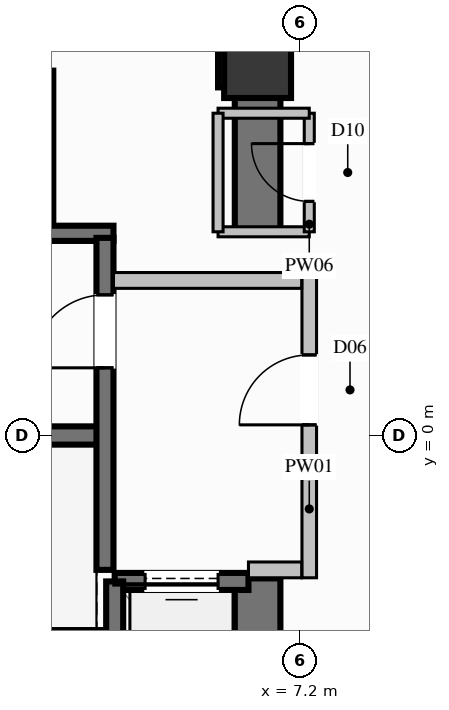
"""IFC4 building model, lengths in metres.
Left out: names, types, materials, properties, quantities, classifications, styles, units other than length and angle.
Written with IfcOpenShell. Run it as: python <this file> out.ifc"""

import sys

from ifc_helpers import new_model, si_unit, direction, frame, frame_2d, origin, origin_2d, place, context, subcontext, project, spatial, rectangle, extrude, element, fill, save


model = new_model("IFC4")
c1 = context("Model", 3, precision=1e-05, world=origin(), true_north=direction((0.0, 1.0)))
c2 = subcontext(c1, "Body", "Model", "MODEL_VIEW")
j1 = project(units=[si_unit("LENGTHUNIT", "METRE"), si_unit("PLANEANGLEUNIT", "RADIAN")], contexts=[c1])
p1 = place(None, origin())
s1 = spatial("IfcSite", under=j1, at=p1, CompositionType="ELEMENT")
p2 = place(p1, origin())
s2 = spatial("IfcBuilding", under=s1, at=p2, CompositionType="ELEMENT")
p3 = place(p2, frame((0.0, 0.0, 64.4)))
s3 = spatial("IfcBuildingStorey", under=s2, at=p3, CompositionType="ELEMENT", Elevation=64.4)
p4 = place(p3, frame((6.5, 6.1, 0.0), z_axis=(0.0, 0.0, 1.0), x_axis=(1.0, 0.0, 0.0)))
e1 = element("IfcColumn", 1, at=p4, inside=s3, PredefinedType="COLUMN", context=c2, shape_type="SweptSolid", body=[
    extrude(rectangle(XDim=1.1, YDim=1.1, at=origin_2d()), origin(), (0.0, 0.0, 1.0), 3.6),
])
p5 = place(p3, frame((-3.99, 0.0, 0.0), z_axis=(0.0, 0.0, 1.0), x_axis=(1.0, 0.0, 0.0)))
e2 = element("IfcWall", 2, at=p5, inside=s3, PredefinedType="SHEAR", context=c2, shape_type="SweptSolid", body=[
    extrude(rectangle(XDim=7.98, YDim=0.3, at=frame_2d((3.99, 0.0))), origin(), (0.0, 0.0, 1.0), 3.6),
])
for number, where, z_axis, x_axis in (
    (3, (-4.13, -3.325, 0.0), (0.0, 0.0, 1.0), (1.0, 0.0, 0.0)),
    (4, (-4.13, 3.325, 0.0), (0.0, 0.0, 1.0), (1.0, 0.0, 0.0)),
):
    element("IfcWall", number, at=place(p3, frame(where, z_axis=z_axis, x_axis=x_axis)), inside=s3, PredefinedType="SOLIDWALL", context=c2, shape_type="SweptSolid", body=[
        extrude(rectangle(XDim=8.26, YDim=0.25, at=frame_2d((4.13, 0.0))), origin(), (0.0, 0.0, 1.0), 3.6),
    ])
p6 = place(p3, frame((5.85, 6.1, 0.0), z_axis=(0.0, 0.0, 1.0), x_axis=(1.0, 0.0, 0.0)))
e5 = element("IfcWall", 5, at=p6, inside=s3, PredefinedType="SHEAR", context=c2, shape_type="SweptSolid", body=[
    extrude(rectangle(XDim=0.275, YDim=0.75, at=frame_2d((0.137, 0.0))), origin(), (0.0, 0.0, 1.0), 3.6),
])
p7 = place(p3, frame((6.5, -6.475, 0.0), z_axis=(0.0, 0.0, 1.0), x_axis=(0.0, 1.0, 0.0)))
e6 = element("IfcWall", 6, at=p7, inside=s3, PredefinedType="SHEAR", context=c2, shape_type="SweptSolid", body=[
    extrude(rectangle(XDim=4.125, YDim=0.75, at=frame_2d((2.062, 0.0))), origin(), (0.0, 0.0, 1.0), 3.6),
])
p8 = place(p3, frame((6.5, 3.35, 0.0), z_axis=(0.0, 0.0, 1.0), x_axis=(0.0, 1.0, 0.0)))
e7 = element("IfcWall", 7, at=p8, inside=s3, PredefinedType="SHEAR", context=c2, shape_type="SweptSolid", body=[
    extrude(rectangle(XDim=3.125, YDim=0.75, at=frame_2d((1.562, 0.0))), origin(), (0.0, 0.0, 1.0), 3.6),
])
p9 = place(p3, frame((3.0, 3.5, 0.0), z_axis=(0.0, 0.0, 1.0), x_axis=(0.0, 1.0, 0.0)))
e8 = element("IfcWall", 8, at=p9, inside=s3, PredefinedType="SOLIDWALL", context=c2, shape_type="SweptSolid", body=[
    extrude(rectangle(XDim=2.5, YDim=0.28, at=frame_2d((1.25, 0.0))), origin(), (0.0, 0.0, 1.0), 3.34),
])
p10 = place(p3, frame((6.35, -2.4, 0.0), z_axis=(0.0, 0.0, 1.0), x_axis=(-1.0, 0.0, 0.0)))
e9 = element("IfcWall", 9, at=p10, inside=s3, PredefinedType="SOLIDWALL", context=c2, shape_type="SweptSolid", body=[
    extrude(rectangle(XDim=2.2, YDim=0.28, at=frame_2d((1.1, 0.0))), origin(), (0.0, 0.0, 1.0), 3.34),
])
p11 = place(p10, frame((0.5, 0.0, 0.0)))
e10 = element("IfcOpeningElement", 10, at=p11, cuts=e9, PredefinedType="OPENING", context=c2, shape_type="SweptSolid", body=[
    extrude(rectangle(XDim=1.2, YDim=2.2, at=frame_2d((0.6, 1.1))), frame((0.0, 0.15, 0.0), z_axis=(0.0, -1.0, 0.0), x_axis=(1.0, 0.0, 0.0)), (0.0, 0.0, 1.0), 0.3),
])
p12 = place(p3, frame((4.15, -2.4, 0.0), z_axis=(0.0, 0.0, 1.0), x_axis=(0.0, -1.0, 0.0)))
e11 = element("IfcWall", 11, at=p12, inside=s3, PredefinedType="SOLIDWALL", context=c2, shape_type="SweptSolid", body=[
    extrude(rectangle(XDim=2.7, YDim=0.28, at=frame_2d((1.35, 0.0))), origin(), (0.0, 0.0, 1.0), 3.34),
])
p13 = place(p3, frame((3.99, -2.21, 0.0), z_axis=(0.0, 0.0, 1.0), x_axis=(0.0, 1.0, 0.0)))
e12 = element("IfcWall", 12, at=p13, inside=s3, PredefinedType="SOLIDWALL", context=c2, shape_type="SweptSolid", body=[
    extrude(rectangle(XDim=5.46, YDim=0.28, at=frame_2d((2.73, 0.0))), origin(), (0.0, 0.0, 1.0), 3.34),
])
p14 = place(p13, frame((3.323, 0.0, 0.0)))
e13 = element("IfcOpeningElement", 13, at=p14, cuts=e12, PredefinedType="OPENING", context=c2, shape_type="SweptSolid", body=[
    extrude(rectangle(XDim=1.2, YDim=2.2, at=frame_2d((0.6, 1.1))), frame((0.0, 0.15, 0.0), z_axis=(0.0, -1.0, 0.0), x_axis=(1.0, 0.0, 0.0)), (0.0, 0.0, 1.0), 0.3),
])
p15 = place(p3, frame((7.35, -2.34, 0.0), z_axis=(0.0, 0.0, 1.0), x_axis=(0.0, 1.0, 0.0)))
e14 = element("IfcWall", 14, at=p15, inside=s3, PredefinedType="PARTITIONING", context=c2, shape_type="SweptSolid", body=[
    extrude(rectangle(XDim=5.02, YDim=0.24, at=frame_2d((2.51, 0.0))), origin(), (0.0, 0.0, 1.0), 2.425),
])
p16 = place(p15, frame((2.515, 0.0, 0.0)))
e15 = element("IfcOpeningElement", 15, at=p16, cuts=e14, PredefinedType="OPENING", context=c2, shape_type="SweptSolid", body=[
    extrude(rectangle(XDim=1.15, YDim=2.2, at=frame_2d((0.575, 1.1))), frame((0.0, 0.13, 0.0), z_axis=(0.0, -1.0, 0.0), x_axis=(1.0, 0.0, 0.0)), (0.0, 0.0, 1.0), 0.26),
])
p17 = place(p3, frame((6.35, -2.21, 0.0), z_axis=(0.0, 0.0, 1.0), x_axis=(1.0, 0.0, 0.0)))
e16 = element("IfcWall", 16, at=p17, inside=s3, PredefinedType="PARTITIONING", context=c2, shape_type="SweptSolid", body=[
    extrude(rectangle(XDim=0.875, YDim=0.26, at=frame_2d((0.438, 0.0))), origin(), (0.0, 0.0, 1.0), 3.34),
])
p18 = place(p3, frame((4.13, 2.55, 0.0), z_axis=(0.0, 0.0, 1.0), x_axis=(1.0, 0.0, 0.0)))
e17 = element("IfcWall", 17, at=p18, inside=s3, PredefinedType="PARTITIONING", context=c2, shape_type="SweptSolid", body=[
    extrude(rectangle(XDim=3.095, YDim=0.26, at=frame_2d((1.548, 0.0))), origin(), (0.0, 0.0, 1.0), 3.34),
])
p19 = place(p3, frame((5.85, 3.35, 0.0), z_axis=(0.0, 0.0, 1.0), x_axis=(1.0, 0.0, 0.0)))
e18 = element("IfcWall", 18, at=p19, inside=s3, PredefinedType="PARTITIONING", context=c2, shape_type="SweptSolid", body=[
    extrude(rectangle(XDim=1.5, YDim=0.165, at=frame_2d((0.75, 0.0))), origin(), (0.0, 0.0, 1.0), 3.34),
])
p20 = place(p3, frame((7.35, 3.35, 0.0), z_axis=(0.0, 0.0, 1.0), x_axis=(0.0, 1.0, 0.0)))
e19 = element("IfcWall", 19, at=p20, inside=s3, PredefinedType="PARTITIONING", context=c2, shape_type="SweptSolid", body=[
    extrude(rectangle(XDim=1.95, YDim=0.165, at=frame_2d((0.975, 0.0))), origin(), (0.0, 0.0, 1.0), 3.34),
])
p21 = place(p20, frame((0.5, 0.0, 0.0)))
e20 = element("IfcOpeningElement", 20, at=p21, cuts=e19, PredefinedType="OPENING", context=c2, shape_type="SweptSolid", body=[
    extrude(rectangle(XDim=0.95, YDim=2.1, at=frame_2d((0.475, 1.05))), frame((0.0, 0.093, 0.0), z_axis=(0.0, -1.0, 0.0), x_axis=(1.0, 0.0, 0.0)), (0.0, 0.0, 1.0), 0.185),
])
p22 = place(p3, frame((7.35, 5.3, 0.0), z_axis=(0.0, 0.0, 1.0), x_axis=(-1.0, 0.0, 0.0)))
e21 = element("IfcWall", 21, at=p22, inside=s3, PredefinedType="PARTITIONING", context=c2, shape_type="SweptSolid", body=[
    extrude(rectangle(XDim=1.5, YDim=0.165, at=frame_2d((0.75, 0.0))), origin(), (0.0, 0.0, 1.0), 2.425),
])
p23 = place(p3, frame((5.85, 5.3, 0.0), z_axis=(0.0, 0.0, 1.0), x_axis=(0.0, -1.0, 0.0)))
e22 = element("IfcWall", 22, at=p23, inside=s3, PredefinedType="PARTITIONING", context=c2, shape_type="SweptSolid", body=[
    extrude(rectangle(XDim=1.95, YDim=0.165, at=frame_2d((0.975, 0.0))), origin(), (0.0, 0.0, 1.0), 2.425),
])
p24 = place(p11, origin())
e23 = element("IfcDoor", 23, at=p24, inside=s3, OperationType="SLIDING_TO_LEFT", PredefinedType="DOOR", context=c2, shape_type="SweptSolid", body=[
    extrude(rectangle(XDim=1.2, YDim=2.2, at=frame_2d((0.6, 1.1))), frame((0.0, 0.025, 0.0), z_axis=(0.0, -1.0, 0.0), x_axis=(1.0, 0.0, 0.0)), (0.0, 0.0, 1.0), 0.05),
])
fill(e10, e23)
p25 = place(p14, origin())
e24 = element("IfcDoor", 24, at=p25, inside=s3, OperationType="SINGLE_SWING_LEFT", PredefinedType="DOOR", context=c2, shape_type="SweptSolid", body=[
    extrude(rectangle(XDim=1.2, YDim=2.2, at=frame_2d((0.6, 1.1))), frame((0.0, 0.025, 0.0), z_axis=(0.0, -1.0, 0.0), x_axis=(1.0, 0.0, 0.0)), (0.0, 0.0, 1.0), 0.05),
])
fill(e13, e24)
p26 = place(p16, origin())
e25 = element("IfcDoor", 25, at=p26, inside=s3, OperationType="SINGLE_SWING_LEFT", PredefinedType="DOOR", context=c2, shape_type="SweptSolid", body=[
    extrude(rectangle(XDim=1.15, YDim=2.2, at=frame_2d((0.575, 1.1))), frame((0.0, 0.025, 0.0), z_axis=(0.0, -1.0, 0.0), x_axis=(1.0, 0.0, 0.0)), (0.0, 0.0, 1.0), 0.05),
])
fill(e15, e25)
p27 = place(p21, origin())
e26 = element("IfcDoor", 26, at=p27, inside=s3, OperationType="SINGLE_SWING_RIGHT", PredefinedType="DOOR", context=c2, shape_type="SweptSolid", body=[
    extrude(rectangle(XDim=0.95, YDim=2.1, at=frame_2d((0.475, 1.05))), frame((0.0, 0.025, 0.0), z_axis=(0.0, -1.0, 0.0), x_axis=(1.0, 0.0, 0.0)), (0.0, 0.0, 1.0), 0.05),
])
fill(e20, e26)
save(model, sys.argv[1])
